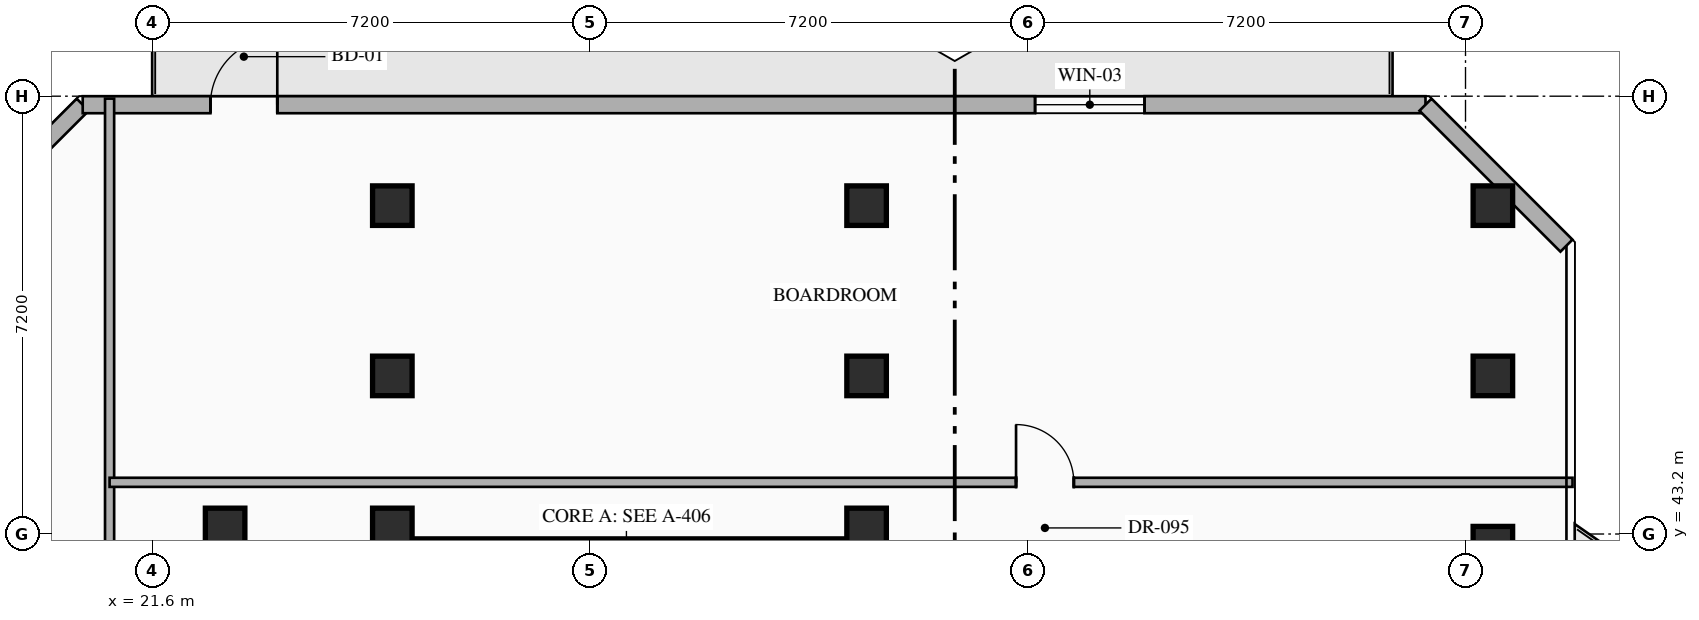
"""IFC4 building model, lengths in metres.
Left out: names, types, materials, properties, quantities, classifications, styles, units other than length and angle.
Written with IfcOpenShell. Run it as: python <this file> out.ifc"""

import sys

from ifc_helpers import new_model, si_unit, direction, frame, frame_2d, origin, origin_2d, place, context, subcontext, project, spatial, rectangle, hollow_rectangle, extrude, element, fill, save


model = new_model("IFC4")
c1 = context("Model", 3, precision=1e-05, world=origin(), true_north=direction((0.0, 1.0)))
c2 = subcontext(c1, "Body", "Model", "MODEL_VIEW")
j1 = project(units=[si_unit("LENGTHUNIT", "METRE"), si_unit("PLANEANGLEUNIT", "RADIAN")], contexts=[c1])
p1 = place(None, origin())
s1 = spatial("IfcSite", under=j1, at=p1, CompositionType="ELEMENT")
p2 = place(p1, origin())
s2 = spatial("IfcBuilding", under=s1, at=p2, CompositionType="ELEMENT")
p3 = place(p2, frame((0.0, 0.0, 250.35)))
s3 = spatial("IfcBuildingStorey", under=s2, at=p3, CompositionType="ELEMENT", Elevation=250.35)
p4 = place(p3, frame((25.77, 42.895, 0.0), z_axis=(0.0, 0.0, 1.0), x_axis=(1.0, 0.0, 0.0)))
e1 = element("IfcWall", 1, at=p4, inside=s3, PredefinedType="SHEAR", context=c2, shape_type="SweptSolid", body=[
    extrude(rectangle(XDim=7.48, YDim=0.45, at=frame_2d((3.74, 0.0))), origin(), (0.0, 0.0, 1.0), 3.6),
])
for number, where, z_axis, x_axis in (
    (2, (25.55, 43.3, 0.0), (0.0, 0.0, 1.0), (1.0, 0.0, 0.0)),
    (3, (33.35, 43.3, 0.0), (0.0, 0.0, 1.0), (1.0, 0.0, 0.0)),
    (4, (43.65, 43.0, 0.0), (0.0, 0.0, 1.0), (1.0, 0.0, 0.0)),
    (5, (25.55, 45.8, 0.0), (0.0, 0.0, 1.0), (1.0, 0.0, 0.0)),
    (6, (33.35, 45.8, 0.0), (0.0, 0.0, 1.0), (1.0, 0.0, 0.0)),
    (7, (43.65, 45.8, 0.0), (0.0, 0.0, 1.0), (1.0, 0.0, 0.0)),
    (8, (25.55, 48.6, 0.0), (0.0, 0.0, 1.0), (1.0, 0.0, 0.0)),
    (9, (33.35, 48.6, 0.0), (0.0, 0.0, 1.0), (1.0, 0.0, 0.0)),
    (10, (43.65, 48.6, 0.0), (0.0, 0.0, 1.0), (1.0, 0.0, 0.0)),
    (11, (22.8, 43.3, 0.0), (0.0, 0.0, 1.0), (1.0, 0.0, 0.0)),
):
    element("IfcColumn", number, at=place(p3, frame(where, z_axis=z_axis, x_axis=x_axis)), inside=s3, PredefinedType="COLUMN", context=c2, shape_type="SweptSolid", body=[
        extrude(hollow_rectangle(XDim=0.65, YDim=0.65, WallThickness=0.025, at=origin_2d()), origin(), (0.0, 0.0, 1.0), 3.6),
    ])
p5 = place(p3, frame((18.14, 47.942, 0.0), z_axis=(0.0, 0.0, 1.0), x_axis=(0.707106781187, 0.707106781187, 0.0)))
e12 = element("IfcWall", 12, at=p5, inside=s3, PredefinedType="STANDARD", context=c2, shape_type="SweptSolid", body=[
    extrude(rectangle(XDim=3.278, YDim=0.28, at=frame_2d((1.639, 0.0))), origin(), (0.0, 0.0, 1.0), 3.35),
])
p6 = place(p3, frame((20.458, 50.26, 0.0), z_axis=(0.0, 0.0, 1.0), x_axis=(1.0, 0.0, 0.0)))
e13 = element("IfcWall", 13, at=p6, inside=s3, PredefinedType="STANDARD", context=c2, shape_type="SweptSolid", body=[
    extrude(rectangle(XDim=22.084, YDim=0.28, at=frame_2d((11.042, 0.0))), origin(), (0.0, 0.0, 1.0), 3.35),
])
p7 = place(p6, frame((2.1, 0.0, 0.0)))
e14 = element("IfcOpeningElement", 14, at=p7, cuts=e13, PredefinedType="OPENING", context=c2, shape_type="SweptSolid", body=[
    extrude(rectangle(XDim=1.1, YDim=2.2, at=frame_2d((0.55, 1.1))), frame((0.0, 0.15, 0.0), z_axis=(0.0, -1.0, 0.0), x_axis=(1.0, 0.0, 0.0)), (0.0, 0.0, 1.0), 0.3),
])
p8 = place(p6, frame((15.663, 0.0, 0.85)))
e15 = element("IfcOpeningElement", 15, at=p8, cuts=e13, PredefinedType="OPENING", context=c2, shape_type="SweptSolid", body=[
    extrude(rectangle(XDim=1.8, YDim=2.1, at=frame_2d((0.9, 1.05))), frame((0.0, 0.15, 0.0), z_axis=(0.0, -1.0, 0.0), x_axis=(1.0, 0.0, 0.0)), (0.0, 0.0, 1.0), 0.3),
])
p9 = place(p3, frame((42.542, 50.26, 0.0), z_axis=(0.0, 0.0, 1.0), x_axis=(0.707106781187, -0.707106781187, 0.0)))
e16 = element("IfcWall", 16, at=p9, inside=s3, PredefinedType="STANDARD", context=c2, shape_type="SweptSolid", body=[
    extrude(rectangle(XDim=3.278, YDim=0.28, at=frame_2d((1.639, 0.0))), origin(), (0.0, 0.0, 1.0), 3.35),
])
p10 = place(p3, frame((20.9, 23.44, 0.0), z_axis=(0.0, 0.0, 1.0), x_axis=(0.0, 1.0, 0.0)))
e17 = element("IfcWall", 17, at=p10, inside=s3, PredefinedType="PARTITIONING", context=c2, shape_type="SweptSolid", body=[
    extrude(rectangle(XDim=26.92, YDim=0.15, at=frame_2d((13.46, 0.0))), origin(), (0.0, 0.0, 1.0), 3.35),
])
p11 = place(p10, frame((7.943, 0.0, 0.0)))
e18 = element("IfcOpeningElement", 18, at=p11, cuts=e17, PredefinedType="OPENING", context=c2, shape_type="SweptSolid", body=[
    extrude(rectangle(XDim=0.95, YDim=2.15, at=frame_2d((0.475, 1.075))), frame((0.0, 0.085, 0.0), z_axis=(0.0, -1.0, 0.0), x_axis=(1.0, 0.0, 0.0)), (0.0, 0.0, 1.0), 0.17),
])
p12 = place(p3, frame((20.9, 44.05, 0.0), z_axis=(0.0, 0.0, 1.0), x_axis=(1.0, 0.0, 0.0)))
e19 = element("IfcWall", 19, at=p12, inside=s3, PredefinedType="PARTITIONING", context=c2, shape_type="SweptSolid", body=[
    extrude(rectangle(XDim=24.06, YDim=0.15, at=frame_2d((12.03, 0.0))), origin(), (0.0, 0.0, 1.0), 3.35),
])
p13 = place(p12, frame((14.908, 0.0, 0.0)))
e20 = element("IfcOpeningElement", 20, at=p13, cuts=e19, PredefinedType="OPENING", context=c2, shape_type="SweptSolid", body=[
    extrude(rectangle(XDim=0.95, YDim=2.15, at=frame_2d((0.475, 1.075))), frame((0.0, 0.085, 0.0), z_axis=(0.0, -1.0, 0.0), x_axis=(1.0, 0.0, 0.0)), (0.0, 0.0, 1.0), 0.17),
])
p14 = place(p7, origin())
e21 = element("IfcDoor", 21, at=p14, inside=s3, OperationType="SINGLE_SWING_RIGHT", PredefinedType="DOOR", context=c2, shape_type="SweptSolid", body=[
    extrude(rectangle(XDim=1.1, YDim=2.2, at=frame_2d((0.55, 1.1))), frame((0.0, 0.025, 0.0), z_axis=(0.0, -1.0, 0.0), x_axis=(1.0, 0.0, 0.0)), (0.0, 0.0, 1.0), 0.05),
])
fill(e14, e21)
p15 = place(p8, origin())
e22 = element("IfcWindow", 22, at=p15, inside=s3, PartitioningType="SINGLE_PANEL", PredefinedType="WINDOW", context=c2, shape_type="SweptSolid", body=[
    extrude(rectangle(XDim=1.8, YDim=2.1, at=frame_2d((0.9, 1.05))), frame((0.0, 0.03, 0.0), z_axis=(0.0, -1.0, 0.0), x_axis=(1.0, 0.0, 0.0)), (0.0, 0.0, 1.0), 0.06),
])
fill(e15, e22)
p16 = place(p13, origin())
e23 = element("IfcDoor", 23, at=p16, inside=s3, OperationType="SINGLE_SWING_LEFT", PredefinedType="DOOR", context=c2, shape_type="SweptSolid", body=[
    extrude(rectangle(XDim=0.95, YDim=2.15, at=frame_2d((0.475, 1.075))), frame((0.0, 0.025, 0.0), z_axis=(0.0, -1.0, 0.0), x_axis=(1.0, 0.0, 0.0)), (0.0, 0.0, 1.0), 0.05),
])
fill(e20, e23)
save(model, sys.argv[1])
